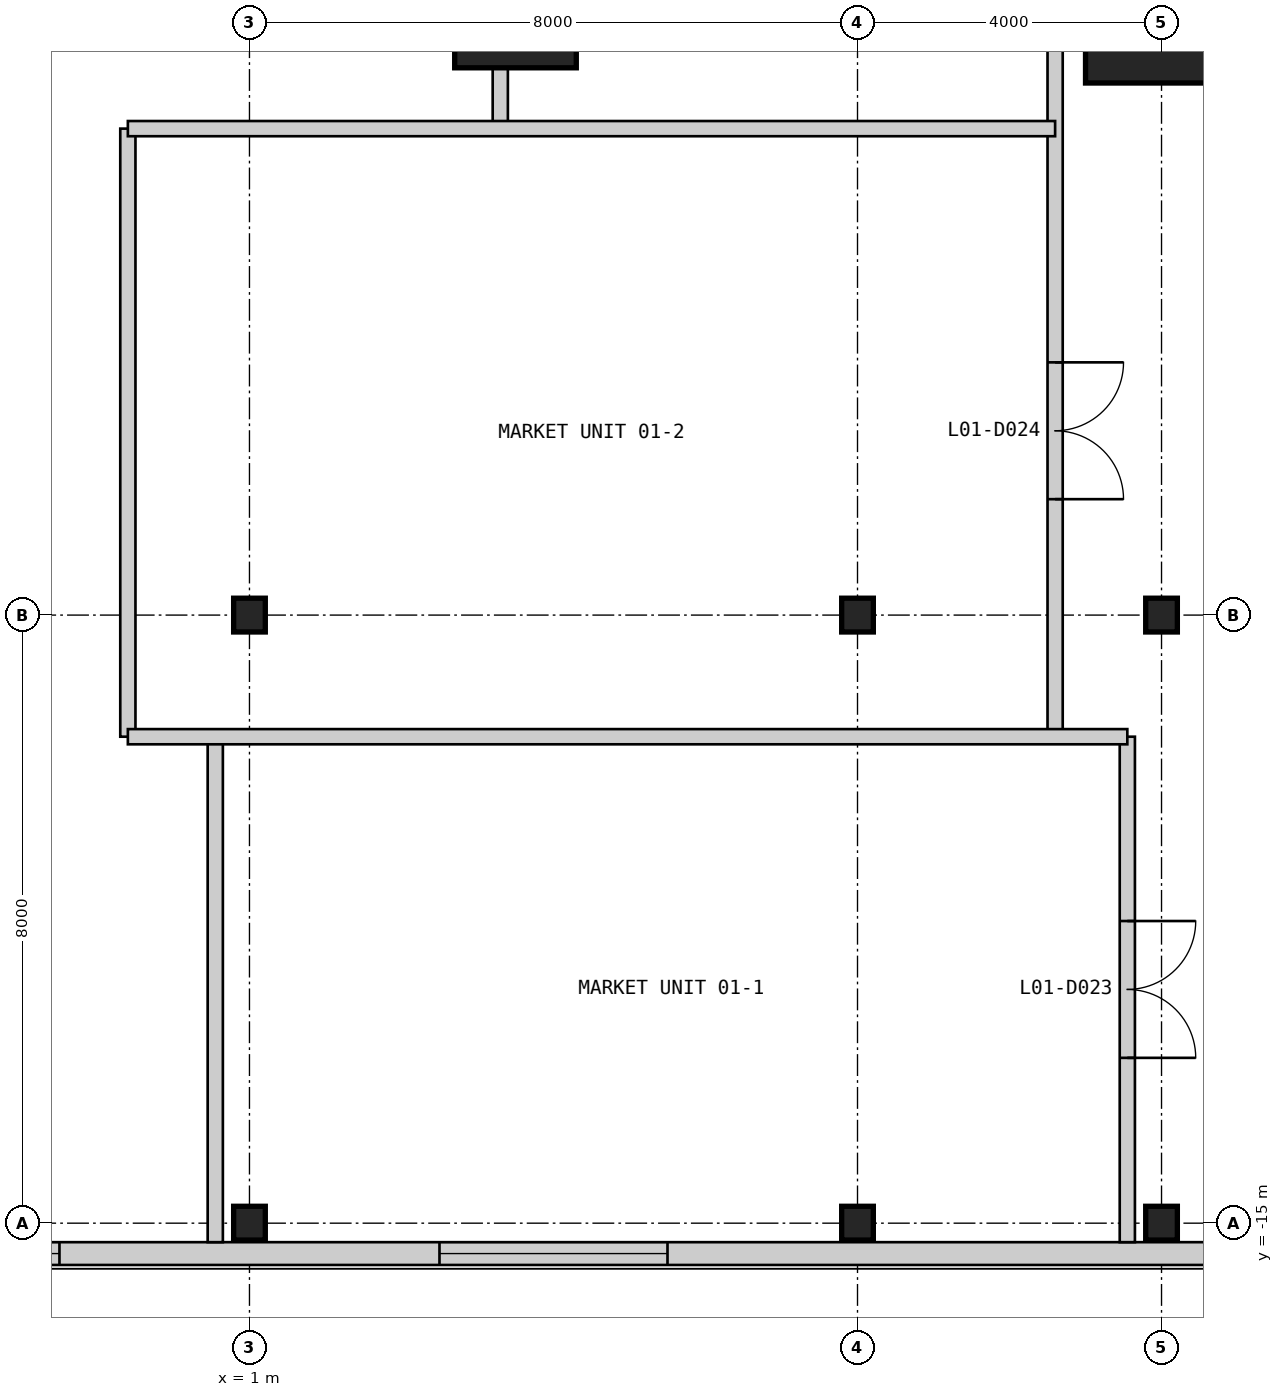
"""IFC4 building model, lengths in metres.
Left out: names, types, materials, properties, quantities, classifications, styles, units other than length and angle.
Written with IfcOpenShell. Run it as: python <this file> out.ifc"""

import sys

from ifc_helpers import new_model, si_unit, direction, frame, frame_2d, origin, origin_2d, place, context, subcontext, project, spatial, rectangle, i_section, extrude, element, fill, save


model = new_model("IFC4")
c1 = context("Model", 3, precision=1e-05, world=origin(), true_north=direction((0.0, 1.0)))
c2 = subcontext(c1, "Body", "Model", "MODEL_VIEW")
j1 = project(units=[si_unit("LENGTHUNIT", "METRE"), si_unit("PLANEANGLEUNIT", "RADIAN")], contexts=[c1])
p1 = place(None, origin())
s1 = spatial("IfcSite", under=j1, at=p1, CompositionType="ELEMENT")
p2 = place(p1, origin())
s2 = spatial("IfcBuilding", under=s1, at=p2, CompositionType="ELEMENT")
p3 = place(p2, frame((0.0, 0.0, 7.0)))
s3 = spatial("IfcBuildingStorey", under=s2, at=p3, CompositionType="ELEMENT", Elevation=7.0)
p4 = place(p3, frame((4.5, 1.0, 0.0), z_axis=(0.0, 0.0, 1.0), x_axis=(1.0, 0.0, 0.0)))
e1 = element("IfcColumn", 1, at=p4, inside=s3, PredefinedType="COLUMN", context=c2, shape_type="SweptSolid", body=[
    extrude(rectangle(XDim=1.6, YDim=1.6, at=origin_2d()), origin(), (0.0, 0.0, 1.0), 4.8),
])
p5 = place(p3, frame((13.0, 1.0, 0.0), z_axis=(0.0, 0.0, 1.0), x_axis=(1.0, 0.0, 0.0)))
e2 = element("IfcColumn", 2, at=p5, inside=s3, PredefinedType="COLUMN", context=c2, shape_type="SweptSolid", body=[
    extrude(rectangle(XDim=2.0, YDim=2.0, at=origin_2d()), origin(), (0.0, 0.0, 1.0), 4.8),
])
for number, where, z_axis, x_axis in (
    (3, (1.0, -15.0, 0.0), (0.0, 0.0, 1.0), (1.0, 0.0, 0.0)),
    (4, (1.0, -7.0, 0.0), (0.0, 0.0, 1.0), (1.0, 0.0, 0.0)),
    (5, (9.0, -15.0, 0.0), (0.0, 0.0, 1.0), (1.0, 0.0, 0.0)),
    (6, (9.0, -7.0, 0.0), (0.0, 0.0, 1.0), (1.0, 0.0, 0.0)),
    (7, (13.0, -15.0, 0.0), (0.0, 0.0, 1.0), (1.0, 0.0, 0.0)),
    (8, (13.0, -7.0, 0.0), (0.0, 0.0, 1.0), (1.0, 0.0, 0.0)),
):
    element("IfcColumn", number, at=place(p3, frame(where, z_axis=z_axis, x_axis=x_axis)), inside=s3, PredefinedType="COLUMN", context=c2, shape_type="SweptSolid", body=[
        extrude(i_section(OverallWidth=0.417, OverallDepth=0.445, WebThickness=0.039, FlangeThickness=0.063, at=origin_2d()), origin(), (0.0, 0.0, 1.0), 4.8),
    ])
p6 = place(p3, frame((-15.55, -15.4, 0.0), z_axis=(0.0, 0.0, 1.0), x_axis=(1.0, 0.0, 0.0)))
e9 = element("IfcWall", 9, at=p6, inside=s3, PredefinedType="SOLIDWALL", context=c2, shape_type="SweptSolid", body=[
    extrude(rectangle(XDim=81.1, YDim=0.3, at=frame_2d((40.55, 0.0))), origin(), (0.0, 0.0, 1.0), 4.5),
])
p7 = place(p6, frame((3.05, 0.0, 0.9)))
e10 = element("IfcOpeningElement", 10, at=p7, cuts=e9, PredefinedType="OPENING", context=c2, shape_type="SweptSolid", body=[
    extrude(rectangle(XDim=3.0, YDim=2.4, at=frame_2d((1.5, 1.2))), frame((0.0, 0.16, 0.0), z_axis=(0.0, -1.0, 0.0), x_axis=(1.0, 0.0, 0.0)), (0.0, 0.0, 1.0), 0.32),
])
p8 = place(p6, frame((11.05, 0.0, 0.9)))
e11 = element("IfcOpeningElement", 11, at=p8, cuts=e9, PredefinedType="OPENING", context=c2, shape_type="SweptSolid", body=[
    extrude(rectangle(XDim=3.0, YDim=2.4, at=frame_2d((1.5, 1.2))), frame((0.0, 0.16, 0.0), z_axis=(0.0, -1.0, 0.0), x_axis=(1.0, 0.0, 0.0)), (0.0, 0.0, 1.0), 0.32),
])
p9 = place(p6, frame((19.05, 0.0, 0.9)))
e12 = element("IfcOpeningElement", 12, at=p9, cuts=e9, PredefinedType="OPENING", context=c2, shape_type="SweptSolid", body=[
    extrude(rectangle(XDim=3.0, YDim=2.4, at=frame_2d((1.5, 1.2))), frame((0.0, 0.16, 0.0), z_axis=(0.0, -1.0, 0.0), x_axis=(1.0, 0.0, 0.0)), (0.0, 0.0, 1.0), 0.32),
])
p10 = place(p6, frame((33.05, 0.0, 0.9)))
e13 = element("IfcOpeningElement", 13, at=p10, cuts=e9, PredefinedType="OPENING", context=c2, shape_type="SweptSolid", body=[
    extrude(rectangle(XDim=3.0, YDim=2.4, at=frame_2d((1.5, 1.2))), frame((0.0, 0.16, 0.0), z_axis=(0.0, -1.0, 0.0), x_axis=(1.0, 0.0, 0.0)), (0.0, 0.0, 1.0), 0.32),
])
p11 = place(p6, frame((45.05, 0.0, 0.9)))
e14 = element("IfcOpeningElement", 14, at=p11, cuts=e9, PredefinedType="OPENING", context=c2, shape_type="SweptSolid", body=[
    extrude(rectangle(XDim=3.0, YDim=2.4, at=frame_2d((1.5, 1.2))), frame((0.0, 0.16, 0.0), z_axis=(0.0, -1.0, 0.0), x_axis=(1.0, 0.0, 0.0)), (0.0, 0.0, 1.0), 0.32),
])
p12 = place(p6, frame((53.55, 0.0, 0.9)))
e15 = element("IfcOpeningElement", 15, at=p12, cuts=e9, PredefinedType="OPENING", context=c2, shape_type="SweptSolid", body=[
    extrude(rectangle(XDim=3.0, YDim=2.4, at=frame_2d((1.5, 1.2))), frame((0.0, 0.16, 0.0), z_axis=(0.0, -1.0, 0.0), x_axis=(1.0, 0.0, 0.0)), (0.0, 0.0, 1.0), 0.32),
])
p13 = place(p6, frame((59.55, 0.0, 0.9)))
e16 = element("IfcOpeningElement", 16, at=p13, cuts=e9, PredefinedType="OPENING", context=c2, shape_type="SweptSolid", body=[
    extrude(rectangle(XDim=3.0, YDim=2.4, at=frame_2d((1.5, 1.2))), frame((0.0, 0.16, 0.0), z_axis=(0.0, -1.0, 0.0), x_axis=(1.0, 0.0, 0.0)), (0.0, 0.0, 1.0), 0.32),
])
p14 = place(p6, frame((67.05, 0.0, 0.9)))
e17 = element("IfcOpeningElement", 17, at=p14, cuts=e9, PredefinedType="OPENING", context=c2, shape_type="SweptSolid", body=[
    extrude(rectangle(XDim=3.0, YDim=2.4, at=frame_2d((1.5, 1.2))), frame((0.0, 0.16, 0.0), z_axis=(0.0, -1.0, 0.0), x_axis=(1.0, 0.0, 0.0)), (0.0, 0.0, 1.0), 0.32),
])
p15 = place(p6, frame((75.05, 0.0, 0.9)))
e18 = element("IfcOpeningElement", 18, at=p15, cuts=e9, PredefinedType="OPENING", context=c2, shape_type="SweptSolid", body=[
    extrude(rectangle(XDim=3.0, YDim=2.4, at=frame_2d((1.5, 1.2))), frame((0.0, 0.16, 0.0), z_axis=(0.0, -1.0, 0.0), x_axis=(1.0, 0.0, 0.0)), (0.0, 0.0, 1.0), 0.32),
])
p16 = place(p3, frame((-0.6, -8.6, 0.0), z_axis=(0.0, 0.0, 1.0), x_axis=(0.0, 1.0, 0.0)))
e19 = element("IfcWall", 19, at=p16, inside=s3, PredefinedType="PARTITIONING", context=c2, shape_type="SweptSolid", body=[
    extrude(rectangle(XDim=8.0, YDim=0.2, at=frame_2d((4.0, 0.0))), origin(), (0.0, 0.0, 1.0), 4.5),
])
p17 = place(p3, frame((0.55, -15.25, 0.0), z_axis=(0.0, 0.0, 1.0), x_axis=(0.0, 1.0, 0.0)))
e20 = element("IfcWall", 20, at=p17, inside=s3, PredefinedType="PARTITIONING", context=c2, shape_type="SweptSolid", body=[
    extrude(rectangle(XDim=6.65, YDim=0.2, at=frame_2d((3.325, 0.0))), origin(), (0.0, 0.0, 1.0), 4.5),
])
p18 = place(p3, frame((4.3, -0.6, 0.0), z_axis=(0.0, 0.0, 1.0), x_axis=(0.0, 1.0, 0.0)))
e21 = element("IfcWall", 21, at=p18, inside=s3, PredefinedType="PARTITIONING", context=c2, shape_type="SweptSolid", body=[
    extrude(rectangle(XDim=0.8, YDim=0.2, at=frame_2d((0.4, 0.0))), origin(), (0.0, 0.0, 1.0), 4.5),
])
p19 = place(p3, frame((11.6, -8.6, 0.0), z_axis=(0.0, 0.0, 1.0), x_axis=(0.0, 1.0, 0.0)))
e22 = element("IfcWall", 22, at=p19, inside=s3, PredefinedType="PARTITIONING", context=c2, shape_type="SweptSolid", body=[
    extrude(rectangle(XDim=15.6, YDim=0.2, at=frame_2d((7.8, 0.0))), origin(), (0.0, 0.0, 1.0), 4.5),
])
p20 = place(p19, frame((3.125, 0.0, 0.0)))
e23 = element("IfcOpeningElement", 23, at=p20, cuts=e22, PredefinedType="OPENING", context=c2, shape_type="SweptSolid", body=[
    extrude(rectangle(XDim=1.8, YDim=2.4, at=frame_2d((0.9, 1.2))), frame((0.0, 0.11, 0.0), z_axis=(0.0, -1.0, 0.0), x_axis=(1.0, 0.0, 0.0)), (0.0, 0.0, 1.0), 0.22),
])
p21 = place(p19, frame((10.45, 0.0, 0.0)))
e24 = element("IfcOpeningElement", 24, at=p21, cuts=e22, PredefinedType="OPENING", context=c2, shape_type="SweptSolid", body=[
    extrude(rectangle(XDim=0.9, YDim=2.2, at=frame_2d((0.45, 1.1))), frame((0.0, 0.11, 0.0), z_axis=(0.0, -1.0, 0.0), x_axis=(1.0, 0.0, 0.0)), (0.0, 0.0, 1.0), 0.22),
])
p22 = place(p19, frame((13.225, 0.0, 0.0)))
e25 = element("IfcOpeningElement", 25, at=p22, cuts=e22, PredefinedType="OPENING", context=c2, shape_type="SweptSolid", body=[
    extrude(rectangle(XDim=0.9, YDim=2.2, at=frame_2d((0.45, 1.1))), frame((0.0, 0.11, 0.0), z_axis=(0.0, -1.0, 0.0), x_axis=(1.0, 0.0, 0.0)), (0.0, 0.0, 1.0), 0.22),
])
p23 = place(p3, frame((12.55, -15.25, 0.0), z_axis=(0.0, 0.0, 1.0), x_axis=(0.0, 1.0, 0.0)))
e26 = element("IfcWall", 26, at=p23, inside=s3, PredefinedType="PARTITIONING", context=c2, shape_type="SweptSolid", body=[
    extrude(rectangle(XDim=6.65, YDim=0.2, at=frame_2d((3.325, 0.0))), origin(), (0.0, 0.0, 1.0), 4.5),
])
p24 = place(p23, frame((2.425, 0.0, 0.0)))
e27 = element("IfcOpeningElement", 27, at=p24, cuts=e26, PredefinedType="OPENING", context=c2, shape_type="SweptSolid", body=[
    extrude(rectangle(XDim=1.8, YDim=2.4, at=frame_2d((0.9, 1.2))), frame((0.0, 0.11, 0.0), z_axis=(0.0, -1.0, 0.0), x_axis=(1.0, 0.0, 0.0)), (0.0, 0.0, 1.0), 0.22),
])
p25 = place(p3, frame((-0.6, -8.6, 0.0), z_axis=(0.0, 0.0, 1.0), x_axis=(1.0, 0.0, 0.0)))
e28 = element("IfcWall", 28, at=p25, inside=s3, PredefinedType="PARTITIONING", context=c2, shape_type="SweptSolid", body=[
    extrude(rectangle(XDim=13.15, YDim=0.2, at=frame_2d((6.575, 0.0))), origin(), (0.0, 0.0, 1.0), 4.5),
])
p26 = place(p3, frame((-0.6, -0.6, 0.0), z_axis=(0.0, 0.0, 1.0), x_axis=(1.0, 0.0, 0.0)))
e29 = element("IfcWall", 29, at=p26, inside=s3, PredefinedType="PARTITIONING", context=c2, shape_type="SweptSolid", body=[
    extrude(rectangle(XDim=12.2, YDim=0.2, at=frame_2d((6.1, 0.0))), origin(), (0.0, 0.0, 1.0), 4.5),
])
p27 = place(p8, origin())
e30 = element("IfcWindow", 30, at=p27, inside=s3, PartitioningType="SINGLE_PANEL", PredefinedType="WINDOW", context=c2, shape_type="SweptSolid", body=[
    extrude(rectangle(XDim=3.0, YDim=2.4, at=frame_2d((1.5, 1.2))), frame((0.0, 0.03, 0.0), z_axis=(0.0, -1.0, 0.0), x_axis=(1.0, 0.0, 0.0)), (0.0, 0.0, 1.0), 0.06),
])
fill(e11, e30)
p28 = place(p9, origin())
e31 = element("IfcWindow", 31, at=p28, inside=s3, PartitioningType="SINGLE_PANEL", PredefinedType="WINDOW", context=c2, shape_type="SweptSolid", body=[
    extrude(rectangle(XDim=3.0, YDim=2.4, at=frame_2d((1.5, 1.2))), frame((0.0, 0.03, 0.0), z_axis=(0.0, -1.0, 0.0), x_axis=(1.0, 0.0, 0.0)), (0.0, 0.0, 1.0), 0.06),
])
fill(e12, e31)
p29 = place(p24, frame((1.8, 0.0, 0.0), z_axis=(0.0, 0.0, 1.0), x_axis=(-1.0, 0.0, 0.0)))
e32 = element("IfcDoor", 32, at=p29, inside=s3, OperationType="DOUBLE_DOOR_SINGLE_SWING", PredefinedType="DOOR", context=c2, shape_type="SweptSolid", body=[
    extrude(rectangle(XDim=1.8, YDim=2.4, at=frame_2d((0.9, 1.2))), frame((0.0, 0.025, 0.0), z_axis=(0.0, -1.0, 0.0), x_axis=(1.0, 0.0, 0.0)), (0.0, 0.0, 1.0), 0.05),
])
fill(e27, e32)
p30 = place(p20, frame((1.8, 0.0, 0.0), z_axis=(0.0, 0.0, 1.0), x_axis=(-1.0, 0.0, 0.0)))
e33 = element("IfcDoor", 33, at=p30, inside=s3, OperationType="DOUBLE_DOOR_SINGLE_SWING", PredefinedType="DOOR", context=c2, shape_type="SweptSolid", body=[
    extrude(rectangle(XDim=1.8, YDim=2.4, at=frame_2d((0.9, 1.2))), frame((0.0, 0.025, 0.0), z_axis=(0.0, -1.0, 0.0), x_axis=(1.0, 0.0, 0.0)), (0.0, 0.0, 1.0), 0.05),
])
fill(e23, e33)
save(model, sys.argv[1])
